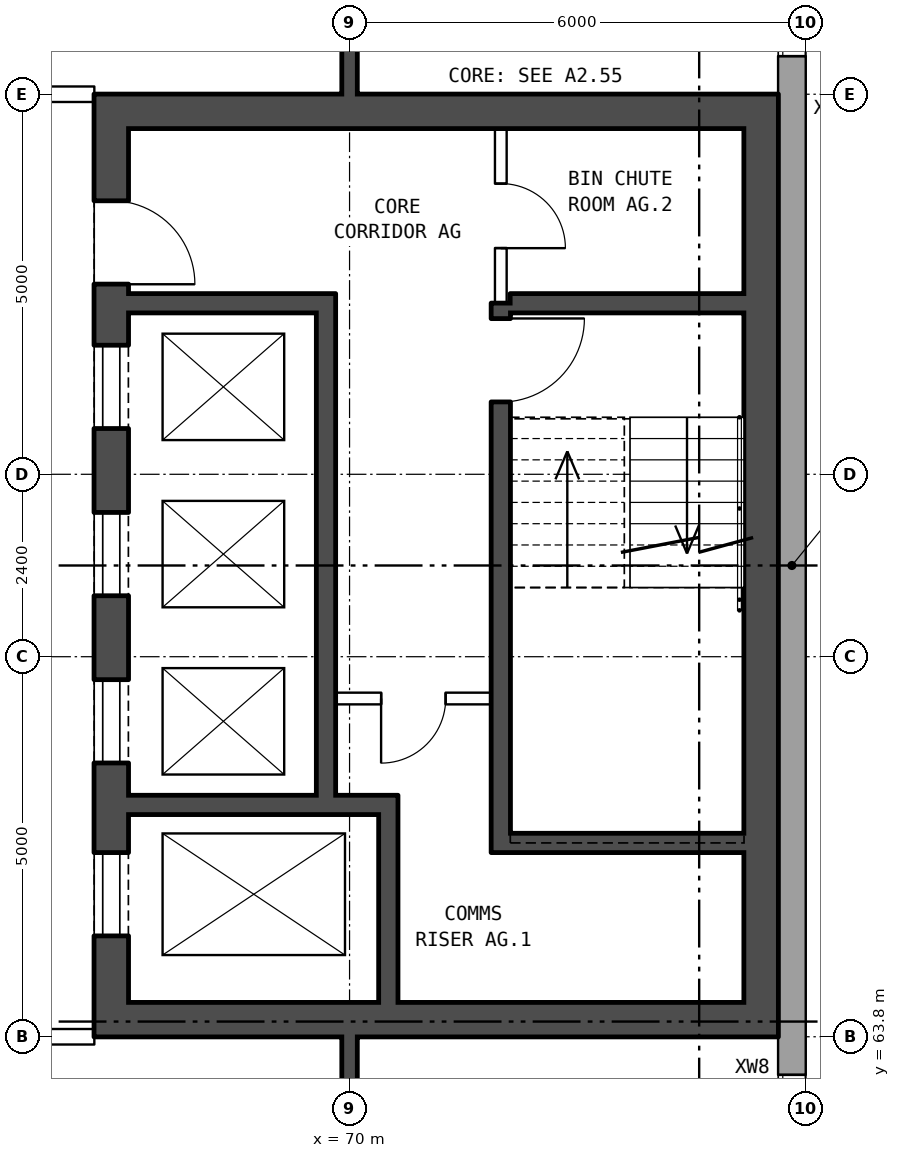
"""IFC4 building model, lengths in metres.
Left out: names, types, materials, properties, quantities, classifications, styles, units other than length and angle.
Written with IfcOpenShell. Run it as: python <this file> out.ifc"""

import sys

from ifc_helpers import new_model, si_unit, direction, frame, frame_2d, origin, place, context, subcontext, project, spatial, rectangle, extrude, element, fill, save


model = new_model("IFC4")
c1 = context("Model", 3, precision=1e-05, world=origin(), true_north=direction((0.0, 1.0)))
c2 = subcontext(c1, "Body", "Model", "MODEL_VIEW")
j1 = project(units=[si_unit("LENGTHUNIT", "METRE"), si_unit("PLANEANGLEUNIT", "RADIAN")], contexts=[c1])
p1 = place(None, origin())
s1 = spatial("IfcSite", under=j1, at=p1, CompositionType="ELEMENT")
p2 = place(p1, origin())
s2 = spatial("IfcBuilding", under=s1, at=p2, CompositionType="ELEMENT")
p3 = place(p2, frame((0.0, 0.0, 191.3)))
s3 = spatial("IfcBuildingStorey", under=s2, at=p3, CompositionType="ELEMENT", Elevation=191.3)
p4 = place(p3, frame((75.82, 57.075, 0.0), z_axis=(0.0, 0.0, 1.0), x_axis=(0.0, 1.0, 0.0)))
e1 = element("IfcWall", 1, at=p4, inside=s3, PredefinedType="STANDARD", context=c2, shape_type="SweptSolid", body=[
    extrude(rectangle(XDim=6.522, YDim=0.36, at=frame_2d((3.261, 0.0))), origin(), (0.0, 0.0, 1.0), 2.85),
])
p5 = place(p4, frame((1.625, 0.0, 0.8)))
e2 = element("IfcOpeningElement", 2, at=p5, cuts=e1, PredefinedType="OPENING", context=c2, shape_type="SweptSolid", body=[
    extrude(rectangle(XDim=1.6, YDim=1.8, at=frame_2d((0.8, 0.9))), frame((0.0, 0.19, 0.0), z_axis=(0.0, -1.0, 0.0), x_axis=(1.0, 0.0, 0.0)), (0.0, 0.0, 1.0), 0.38),
])
p6 = place(p4, frame((4.625, 0.0, 0.8)))
e3 = element("IfcOpeningElement", 3, at=p6, cuts=e1, PredefinedType="OPENING", context=c2, shape_type="SweptSolid", body=[
    extrude(rectangle(XDim=1.6, YDim=1.8, at=frame_2d((0.8, 0.9))), frame((0.0, 0.19, 0.0), z_axis=(0.0, -1.0, 0.0), x_axis=(1.0, 0.0, 0.0)), (0.0, 0.0, 1.0), 0.38),
])
p7 = place(p3, frame((75.82, 63.597, 0.0), z_axis=(0.0, 0.0, 1.0), x_axis=(0.0, 1.0, 0.0)))
e4 = element("IfcWall", 4, at=p7, inside=s3, PredefinedType="STANDARD", context=c2, shape_type="SweptSolid", body=[
    extrude(rectangle(XDim=0.806, YDim=0.36, at=frame_2d((0.403, 0.0))), origin(), (0.0, 0.0, 1.0), 1.947),
])
p8 = place(p3, frame((75.82, 64.403, 0.0), z_axis=(0.0, 0.0, 1.0), x_axis=(0.0, 1.0, 0.0)))
e5 = element("IfcWall", 5, at=p8, inside=s3, PredefinedType="STANDARD", context=c2, shape_type="SweptSolid", body=[
    extrude(rectangle(XDim=11.194, YDim=0.36, at=frame_2d((5.597, 0.0))), origin(), (0.0, 0.0, 1.0), 2.85),
])
p9 = place(p3, frame((75.82, 75.597, 0.0), z_axis=(0.0, 0.0, 1.0), x_axis=(0.0, 1.0, 0.0)))
e6 = element("IfcWall", 6, at=p9, inside=s3, PredefinedType="STANDARD", context=c2, shape_type="SweptSolid", body=[
    extrude(rectangle(XDim=0.806, YDim=0.36, at=frame_2d((0.403, 0.0))), origin(), (0.0, 0.0, 1.0), 1.947),
])
p10 = place(p3, frame((75.82, 76.403, 0.0), z_axis=(0.0, 0.0, 1.0), x_axis=(0.0, 1.0, 0.0)))
e7 = element("IfcWall", 7, at=p10, inside=s3, PredefinedType="STANDARD", context=c2, shape_type="SweptSolid", body=[
    extrude(rectangle(XDim=6.522, YDim=0.36, at=frame_2d((3.261, 0.0))), origin(), (0.0, 0.0, 1.0), 2.85),
])
p11 = place(p10, frame((0.297, 0.0, 0.8)))
e8 = element("IfcOpeningElement", 8, at=p11, cuts=e7, PredefinedType="OPENING", context=c2, shape_type="SweptSolid", body=[
    extrude(rectangle(XDim=1.6, YDim=1.8, at=frame_2d((0.8, 0.9))), frame((0.0, 0.19, 0.0), z_axis=(0.0, -1.0, 0.0), x_axis=(1.0, 0.0, 0.0)), (0.0, 0.0, 1.0), 0.38),
])
p12 = place(p10, frame((3.297, 0.0, 0.8)))
e9 = element("IfcOpeningElement", 9, at=p12, cuts=e7, PredefinedType="OPENING", context=c2, shape_type="SweptSolid", body=[
    extrude(rectangle(XDim=1.6, YDim=1.8, at=frame_2d((0.8, 0.9))), frame((0.0, 0.19, 0.0), z_axis=(0.0, -1.0, 0.0), x_axis=(1.0, 0.0, 0.0)), (0.0, 0.0, 1.0), 0.38),
])
p13 = place(p3, frame((66.865, 63.8, 0.0), z_axis=(0.0, 0.0, 1.0), x_axis=(0.0, 1.0, 0.0)))
e10 = element("IfcWall", 10, at=p13, inside=s3, PredefinedType="SHEAR", context=c2, shape_type="SweptSolid", body=[
    extrude(rectangle(XDim=12.4, YDim=0.45, at=frame_2d((6.2, 0.0))), origin(), (0.0, 0.0, 1.0), 2.85),
])
p14 = place(p13, frame((1.325, 0.0, 0.0)))
e11 = element("IfcOpeningElement", 11, at=p14, cuts=e10, PredefinedType="OPENING", context=c2, shape_type="SweptSolid", body=[
    extrude(rectangle(XDim=1.1, YDim=2.1, at=frame_2d((0.55, 1.05))), frame((0.0, 0.235, 0.0), z_axis=(0.0, -1.0, 0.0), x_axis=(1.0, 0.0, 0.0)), (0.0, 0.0, 1.0), 0.47),
])
p15 = place(p13, frame((3.6, 0.0, 0.0)))
e12 = element("IfcOpeningElement", 12, at=p15, cuts=e10, PredefinedType="OPENING", context=c2, shape_type="SweptSolid", body=[
    extrude(rectangle(XDim=1.1, YDim=2.1, at=frame_2d((0.55, 1.05))), frame((0.0, 0.235, 0.0), z_axis=(0.0, -1.0, 0.0), x_axis=(1.0, 0.0, 0.0)), (0.0, 0.0, 1.0), 0.47),
])
p16 = place(p13, frame((5.8, 0.0, 0.0)))
e13 = element("IfcOpeningElement", 13, at=p16, cuts=e10, PredefinedType="OPENING", context=c2, shape_type="SweptSolid", body=[
    extrude(rectangle(XDim=1.1, YDim=2.1, at=frame_2d((0.55, 1.05))), frame((0.0, 0.235, 0.0), z_axis=(0.0, -1.0, 0.0), x_axis=(1.0, 0.0, 0.0)), (0.0, 0.0, 1.0), 0.47),
])
p17 = place(p13, frame((8.0, 0.0, 0.0)))
e14 = element("IfcOpeningElement", 14, at=p17, cuts=e10, PredefinedType="OPENING", context=c2, shape_type="SweptSolid", body=[
    extrude(rectangle(XDim=1.1, YDim=2.1, at=frame_2d((0.55, 1.05))), frame((0.0, 0.235, 0.0), z_axis=(0.0, -1.0, 0.0), x_axis=(1.0, 0.0, 0.0)), (0.0, 0.0, 1.0), 0.47),
])
p18 = place(p13, frame((9.9, 0.0, 0.0)))
e15 = element("IfcOpeningElement", 15, at=p18, cuts=e10, PredefinedType="OPENING", context=c2, shape_type="SweptSolid", body=[
    extrude(rectangle(XDim=1.1, YDim=2.1, at=frame_2d((0.55, 1.05))), frame((0.0, 0.235, 0.0), z_axis=(0.0, -1.0, 0.0), x_axis=(1.0, 0.0, 0.0)), (0.0, 0.0, 1.0), 0.47),
])
p19 = place(p3, frame((75.415, 63.8, 0.0), z_axis=(0.0, 0.0, 1.0), x_axis=(0.0, 1.0, 0.0)))
e16 = element("IfcWall", 16, at=p19, inside=s3, PredefinedType="SHEAR", context=c2, shape_type="SweptSolid", body=[
    extrude(rectangle(XDim=12.4, YDim=0.45, at=frame_2d((6.2, 0.0))), origin(), (0.0, 0.0, 1.0), 2.85),
])
for number, where, z_axis, x_axis in (
    (17, (67.09, 64.025, 0.0), (0.0, 0.0, 1.0), (1.0, 0.0, 0.0)),
    (18, (67.09, 75.975, 0.0), (0.0, 0.0, 1.0), (1.0, 0.0, 0.0)),
):
    element("IfcWall", number, at=place(p3, frame(where, z_axis=z_axis, x_axis=x_axis)), inside=s3, PredefinedType="SHEAR", context=c2, shape_type="SweptSolid", body=[
        extrude(rectangle(XDim=8.1, YDim=0.45, at=frame_2d((4.05, 0.0))), origin(), (0.0, 0.0, 1.0), 2.85),
    ])
p20 = place(p3, frame((72.115, 66.35, 0.0), z_axis=(0.0, 0.0, 1.0), x_axis=(1.0, 0.0, 0.0)))
e19 = element("IfcWall", 19, at=p20, inside=s3, PredefinedType="SHEAR", context=c2, shape_type="SweptSolid", body=[
    extrude(rectangle(XDim=3.075, YDim=0.25, at=frame_2d((1.538, 0.0))), origin(), (0.0, 0.0, 1.0), 2.85),
])
p21 = place(p3, frame((67.09, 66.85, 0.0), z_axis=(0.0, 0.0, 1.0), x_axis=(1.0, 0.0, 0.0)))
e20 = element("IfcWall", 20, at=p21, inside=s3, PredefinedType="SHEAR", context=c2, shape_type="SweptSolid", body=[
    extrude(rectangle(XDim=3.545, YDim=0.25, at=frame_2d((1.772, 0.0))), origin(), (0.0, 0.0, 1.0), 2.85),
])
p22 = place(p3, frame((69.815, 68.25, 0.0), z_axis=(0.0, 0.0, 1.0), x_axis=(1.0, 0.0, 0.0)))
e21 = element("IfcWall", 21, at=p22, inside=s3, PredefinedType="PARTITIONING", context=c2, shape_type="SweptSolid", body=[
    extrude(rectangle(XDim=2.05, YDim=0.15, at=frame_2d((1.025, 0.0))), origin(), (0.0, 0.0, 1.0), 2.85),
])
p23 = place(p22, frame((0.6, 0.0, 0.0)))
e22 = element("IfcOpeningElement", 22, at=p23, cuts=e21, PredefinedType="OPENING", context=c2, shape_type="SweptSolid", body=[
    extrude(rectangle(XDim=0.85, YDim=2.1, at=frame_2d((0.425, 1.05))), frame((0.0, 0.085, 0.0), z_axis=(0.0, -1.0, 0.0), x_axis=(1.0, 0.0, 0.0)), (0.0, 0.0, 1.0), 0.17),
])
p24 = place(p3, frame((67.09, 73.45, 0.0), z_axis=(0.0, 0.0, 1.0), x_axis=(1.0, 0.0, 0.0)))
e23 = element("IfcWall", 23, at=p24, inside=s3, PredefinedType="SHEAR", context=c2, shape_type="SweptSolid", body=[
    extrude(rectangle(XDim=2.475, YDim=0.25, at=frame_2d((1.237, 0.0))), origin(), (0.0, 0.0, 1.0), 2.85),
])
p25 = place(p3, frame((72.115, 73.45, 0.0), z_axis=(0.0, 0.0, 1.0), x_axis=(1.0, 0.0, 0.0)))
e24 = element("IfcWall", 24, at=p25, inside=s3, PredefinedType="SHEAR", context=c2, shape_type="SweptSolid", body=[
    extrude(rectangle(XDim=3.075, YDim=0.25, at=frame_2d((1.538, 0.0))), origin(), (0.0, 0.0, 1.0), 2.85),
])
p26 = place(p3, frame((69.69, 66.975, 0.0), z_axis=(0.0, 0.0, 1.0), x_axis=(0.0, 1.0, 0.0)))
e25 = element("IfcWall", 25, at=p26, inside=s3, PredefinedType="SHEAR", context=c2, shape_type="SweptSolid", body=[
    extrude(rectangle(XDim=6.6, YDim=0.25, at=frame_2d((3.3, 0.0))), origin(), (0.0, 0.0, 1.0), 2.85),
])
p27 = place(p3, frame((70.51, 64.25, 0.0), z_axis=(0.0, 0.0, 1.0), x_axis=(0.0, 1.0, 0.0)))
e26 = element("IfcWall", 26, at=p27, inside=s3, PredefinedType="SHEAR", context=c2, shape_type="SweptSolid", body=[
    extrude(rectangle(XDim=2.475, YDim=0.25, at=frame_2d((1.238, 0.0))), origin(), (0.0, 0.0, 1.0), 2.85),
])
p28 = place(p3, frame((71.99, 66.225, 0.0), z_axis=(0.0, 0.0, 1.0), x_axis=(0.0, 1.0, 0.0)))
e27 = element("IfcWall", 27, at=p28, inside=s3, PredefinedType="SHEAR", context=c2, shape_type="SweptSolid", body=[
    extrude(rectangle(XDim=7.225, YDim=0.25, at=frame_2d((3.612, 0.0))), origin(), (0.0, 0.0, 1.0), 2.85),
])
p29 = place(p28, frame((5.925, 0.0, 0.0)))
e28 = element("IfcOpeningElement", 28, at=p29, cuts=e27, PredefinedType="OPENING", context=c2, shape_type="SweptSolid", body=[
    extrude(rectangle(XDim=1.1, YDim=2.1, at=frame_2d((0.55, 1.05))), frame((0.0, 0.135, 0.0), z_axis=(0.0, -1.0, 0.0), x_axis=(1.0, 0.0, 0.0)), (0.0, 0.0, 1.0), 0.27),
])
p30 = place(p3, frame((71.99, 73.45, 0.0), z_axis=(0.0, 0.0, 1.0), x_axis=(0.0, 1.0, 0.0)))
e29 = element("IfcWall", 29, at=p30, inside=s3, PredefinedType="PARTITIONING", context=c2, shape_type="SweptSolid", body=[
    extrude(rectangle(XDim=2.3, YDim=0.15, at=frame_2d((1.15, 0.0))), origin(), (0.0, 0.0, 1.0), 2.85),
])
p31 = place(p30, frame((0.725, 0.0, 0.0)))
e30 = element("IfcOpeningElement", 30, at=p31, cuts=e29, PredefinedType="OPENING", context=c2, shape_type="SweptSolid", body=[
    extrude(rectangle(XDim=0.85, YDim=2.1, at=frame_2d((0.425, 1.05))), frame((0.0, 0.085, 0.0), z_axis=(0.0, -1.0, 0.0), x_axis=(1.0, 0.0, 0.0)), (0.0, 0.0, 1.0), 0.17),
])
p32 = place(p3, frame((63.64, 63.8, 0.0), z_axis=(0.0, 0.0, 1.0), x_axis=(1.0, 0.0, 0.0)))
e31 = element("IfcWall", 31, at=p32, inside=s3, PredefinedType="PARTITIONING", context=c2, shape_type="SweptSolid", body=[
    extrude(rectangle(XDim=3.0, YDim=0.2, at=frame_2d((1.5, 0.0))), origin(), (0.0, 0.0, 1.0), 2.85),
])
p33 = place(p32, frame((1.18, 0.0, 0.0)))
e32 = element("IfcOpeningElement", 32, at=p33, cuts=e31, PredefinedType="OPENING", context=c2, shape_type="SweptSolid", body=[
    extrude(rectangle(XDim=1.0, YDim=2.1, at=frame_2d((0.5, 1.05))), frame((0.0, 0.11, 0.0), z_axis=(0.0, -1.0, 0.0), x_axis=(1.0, 0.0, 0.0)), (0.0, 0.0, 1.0), 0.22),
])
p34 = place(p3, frame((63.64, 76.2, 0.0), z_axis=(0.0, 0.0, 1.0), x_axis=(1.0, 0.0, 0.0)))
e33 = element("IfcWall", 33, at=p34, inside=s3, PredefinedType="PARTITIONING", context=c2, shape_type="SweptSolid", body=[
    extrude(rectangle(XDim=3.0, YDim=0.2, at=frame_2d((1.5, 0.0))), origin(), (0.0, 0.0, 1.0), 2.85),
])
p35 = place(p34, frame((1.18, 0.0, 0.0)))
e34 = element("IfcOpeningElement", 34, at=p35, cuts=e33, PredefinedType="OPENING", context=c2, shape_type="SweptSolid", body=[
    extrude(rectangle(XDim=1.0, YDim=2.1, at=frame_2d((0.5, 1.05))), frame((0.0, 0.11, 0.0), z_axis=(0.0, -1.0, 0.0), x_axis=(1.0, 0.0, 0.0)), (0.0, 0.0, 1.0), 0.22),
])
p36 = place(p3, frame((70.0, 54.36, 0.0), z_axis=(0.0, 0.0, 1.0), x_axis=(0.0, 1.0, 0.0)))
e35 = element("IfcWall", 35, at=p36, inside=s3, PredefinedType="SOLIDWALL", context=c2, shape_type="SweptSolid", body=[
    extrude(rectangle(XDim=9.44, YDim=0.2, at=frame_2d((4.72, 0.0))), origin(), (0.0, 0.0, 1.0), 2.85),
])
p37 = place(p36, frame((7.34, 0.0, 0.0)))
e36 = element("IfcOpeningElement", 36, at=p37, cuts=e35, PredefinedType="OPENING", context=c2, shape_type="SweptSolid", body=[
    extrude(rectangle(XDim=0.9, YDim=2.1, at=frame_2d((0.45, 1.05))), frame((0.0, 0.11, 0.0), z_axis=(0.0, -1.0, 0.0), x_axis=(1.0, 0.0, 0.0)), (0.0, 0.0, 1.0), 0.22),
])
p38 = place(p3, frame((70.0, 76.2, 0.0), z_axis=(0.0, 0.0, 1.0), x_axis=(0.0, 1.0, 0.0)))
e37 = element("IfcWall", 37, at=p38, inside=s3, PredefinedType="SOLIDWALL", context=c2, shape_type="SweptSolid", body=[
    extrude(rectangle(XDim=9.44, YDim=0.2, at=frame_2d((4.72, 0.0))), origin(), (0.0, 0.0, 1.0), 2.85),
])
p39 = place(p38, frame((1.35, 0.0, 0.0)))
e38 = element("IfcOpeningElement", 38, at=p39, cuts=e37, PredefinedType="OPENING", context=c2, shape_type="SweptSolid", body=[
    extrude(rectangle(XDim=0.9, YDim=2.1, at=frame_2d((0.45, 1.05))), frame((0.0, 0.11, 0.0), z_axis=(0.0, -1.0, 0.0), x_axis=(1.0, 0.0, 0.0)), (0.0, 0.0, 1.0), 0.22),
])
p40 = place(p6, origin())
e39 = element("IfcWindow", 39, at=p40, inside=s3, PartitioningType="SINGLE_PANEL", PredefinedType="WINDOW", context=c2, shape_type="SweptSolid", body=[
    extrude(rectangle(XDim=1.6, YDim=1.8, at=frame_2d((0.8, 0.9))), frame((0.0, 0.15, 0.0), z_axis=(0.0, -1.0, 0.0), x_axis=(1.0, 0.0, 0.0)), (0.0, 0.0, 1.0), 0.06),
])
fill(e3, e39)
p41 = place(p11, origin())
e40 = element("IfcWindow", 40, at=p41, inside=s3, PartitioningType="SINGLE_PANEL", PredefinedType="WINDOW", context=c2, shape_type="SweptSolid", body=[
    extrude(rectangle(XDim=1.6, YDim=1.8, at=frame_2d((0.8, 0.9))), frame((0.0, 0.15, 0.0), z_axis=(0.0, -1.0, 0.0), x_axis=(1.0, 0.0, 0.0)), (0.0, 0.0, 1.0), 0.06),
])
fill(e8, e40)
p42 = place(p14, origin())
e41 = element("IfcDoor", 41, at=p42, inside=s3, OperationType="DOUBLE_DOOR_SLIDING", PredefinedType="DOOR", context=c2, shape_type="SweptSolid", body=[
    extrude(rectangle(XDim=1.1, YDim=2.1, at=frame_2d((0.55, 1.05))), frame((0.0, -0.16, 0.0), z_axis=(0.0, -1.0, 0.0), x_axis=(1.0, 0.0, 0.0)), (0.0, 0.0, 1.0), 0.05),
])
fill(e11, e41)
p43 = place(p15, origin())
e42 = element("IfcDoor", 42, at=p43, inside=s3, OperationType="DOUBLE_DOOR_SLIDING", PredefinedType="DOOR", context=c2, shape_type="SweptSolid", body=[
    extrude(rectangle(XDim=1.1, YDim=2.1, at=frame_2d((0.55, 1.05))), frame((0.0, -0.16, 0.0), z_axis=(0.0, -1.0, 0.0), x_axis=(1.0, 0.0, 0.0)), (0.0, 0.0, 1.0), 0.05),
])
fill(e12, e42)
p44 = place(p16, origin())
e43 = element("IfcDoor", 43, at=p44, inside=s3, OperationType="DOUBLE_DOOR_SLIDING", PredefinedType="DOOR", context=c2, shape_type="SweptSolid", body=[
    extrude(rectangle(XDim=1.1, YDim=2.1, at=frame_2d((0.55, 1.05))), frame((0.0, -0.16, 0.0), z_axis=(0.0, -1.0, 0.0), x_axis=(1.0, 0.0, 0.0)), (0.0, 0.0, 1.0), 0.05),
])
fill(e13, e43)
p45 = place(p17, origin())
e44 = element("IfcDoor", 44, at=p45, inside=s3, OperationType="DOUBLE_DOOR_SLIDING", PredefinedType="DOOR", context=c2, shape_type="SweptSolid", body=[
    extrude(rectangle(XDim=1.1, YDim=2.1, at=frame_2d((0.55, 1.05))), frame((0.0, -0.16, 0.0), z_axis=(0.0, -1.0, 0.0), x_axis=(1.0, 0.0, 0.0)), (0.0, 0.0, 1.0), 0.05),
])
fill(e14, e44)
p46 = place(p18, frame((1.1, 0.0, 0.0), z_axis=(0.0, 0.0, 1.0), x_axis=(-1.0, 0.0, 0.0)))
e45 = element("IfcDoor", 45, at=p46, inside=s3, OperationType="SINGLE_SWING_RIGHT", PredefinedType="DOOR", context=c2, shape_type="SweptSolid", body=[
    extrude(rectangle(XDim=1.1, YDim=2.1, at=frame_2d((0.55, 1.05))), frame((0.0, 0.21, 0.0), z_axis=(0.0, -1.0, 0.0), x_axis=(1.0, 0.0, 0.0)), (0.0, 0.0, 1.0), 0.05),
])
fill(e15, e45)
p47 = place(p29, frame((1.1, 0.0, 0.0), z_axis=(0.0, 0.0, 1.0), x_axis=(-1.0, 0.0, 0.0)))
e46 = element("IfcDoor", 46, at=p47, inside=s3, OperationType="SINGLE_SWING_LEFT", PredefinedType="DOOR", context=c2, shape_type="SweptSolid", body=[
    extrude(rectangle(XDim=1.1, YDim=2.1, at=frame_2d((0.55, 1.05))), frame((0.0, 0.025, 0.0), z_axis=(0.0, -1.0, 0.0), x_axis=(1.0, 0.0, 0.0)), (0.0, 0.0, 1.0), 0.05),
])
fill(e28, e46)
p48 = place(p23, frame((0.85, 0.0, 0.0), z_axis=(0.0, 0.0, 1.0), x_axis=(-1.0, 0.0, 0.0)))
e47 = element("IfcDoor", 47, at=p48, inside=s3, OperationType="SINGLE_SWING_RIGHT", PredefinedType="DOOR", context=c2, shape_type="SweptSolid", body=[
    extrude(rectangle(XDim=0.85, YDim=2.1, at=frame_2d((0.425, 1.05))), frame((0.0, 0.025, 0.0), z_axis=(0.0, -1.0, 0.0), x_axis=(1.0, 0.0, 0.0)), (0.0, 0.0, 1.0), 0.05),
])
fill(e22, e47)
p49 = place(p31, frame((0.85, 0.0, 0.0), z_axis=(0.0, 0.0, 1.0), x_axis=(-1.0, 0.0, 0.0)))
e48 = element("IfcDoor", 48, at=p49, inside=s3, OperationType="SINGLE_SWING_RIGHT", PredefinedType="DOOR", context=c2, shape_type="SweptSolid", body=[
    extrude(rectangle(XDim=0.85, YDim=2.1, at=frame_2d((0.425, 1.05))), frame((0.0, 0.025, 0.0), z_axis=(0.0, -1.0, 0.0), x_axis=(1.0, 0.0, 0.0)), (0.0, 0.0, 1.0), 0.05),
])
fill(e30, e48)
save(model, sys.argv[1])
